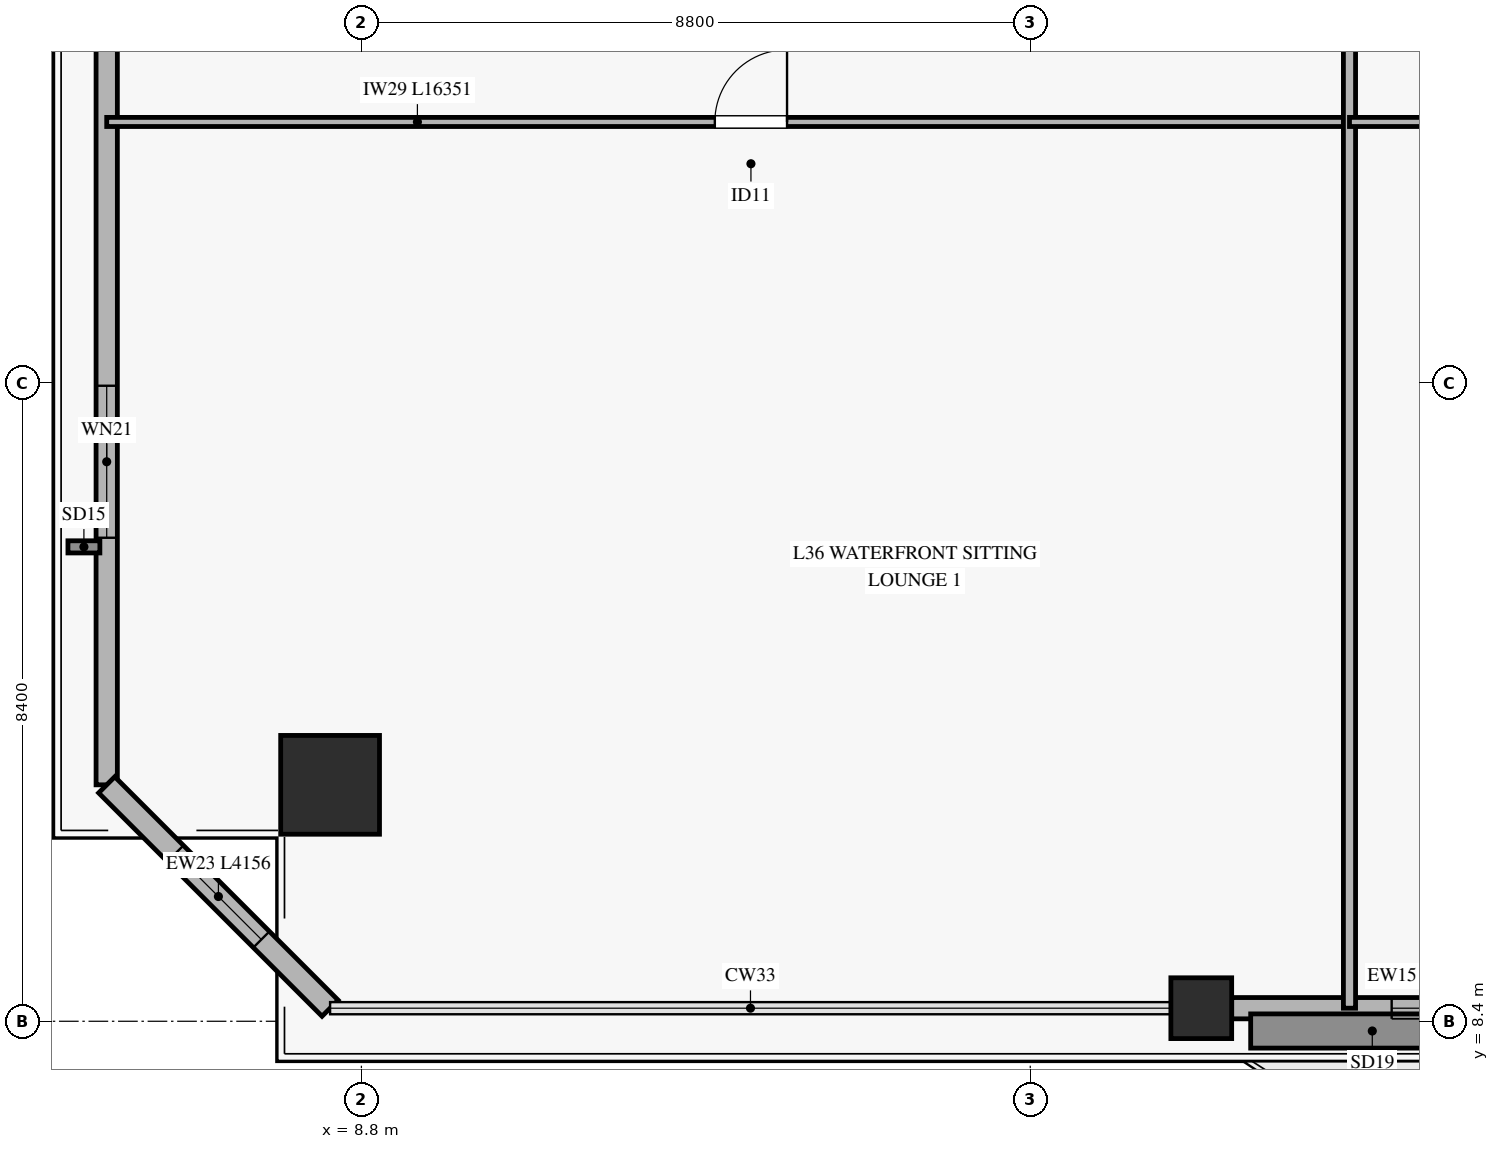
"""IFC4 building model, lengths in metres.
Left out: names, types, materials, properties, quantities, classifications, styles, units other than length and angle.
Written with IfcOpenShell. Run it as: python <this file> out.ifc"""

import sys

from ifc_helpers import new_model, si_unit, direction, frame, frame_2d, origin, origin_2d, place, context, subcontext, project, spatial, rectangle, hollow_rectangle, extrude, source, transform, mapped, element, fill, save


model = new_model("IFC4")
c1 = context("Model", 3, precision=1e-05, world=origin(), true_north=direction((0.0, 1.0)))
c2 = subcontext(c1, "Body", "Model", "MODEL_VIEW")
j1 = project(units=[si_unit("LENGTHUNIT", "METRE"), si_unit("PLANEANGLEUNIT", "RADIAN")], contexts=[c1])
p1 = place(None, origin())
s1 = spatial("IfcSite", under=j1, at=p1, CompositionType="ELEMENT")
p2 = place(p1, origin())
s2 = spatial("IfcBuilding", under=s1, at=p2, CompositionType="ELEMENT")
p3 = place(p2, frame((0.0, 0.0, 149.2)))
s3 = spatial("IfcBuildingStorey", under=s2, at=p3, CompositionType="ELEMENT", Elevation=149.2)
m1 = source(origin(), c2, "Body", "SweptSolid", [
    extrude(hollow_rectangle(XDim=1.3, YDim=1.3, WallThickness=0.06, at=origin_2d()), origin(), (0.0, 0.0, 1.0), 3.27),
])
p4 = place(p3, frame((8.388, 11.511, 0.0), z_axis=(0.0, 0.0, 1.0), x_axis=(1.0, 0.0, 0.0)))
e1 = element("IfcColumn", 1, at=p4, inside=s3, PredefinedType="COLUMN", context=c2, shape_type="MappedRepresentation", body=[
    mapped(m1, transform((0.0, 0.0, 0.0), x_axis=(1.0, 0.0, 0.0), y_axis=(0.0, 1.0, 0.0), z_axis=(0.0, 0.0, 1.0), scale=1.0)),
])
m2 = source(origin(), c2, "Body", "SweptSolid", [
    extrude(hollow_rectangle(XDim=0.8, YDim=0.8, WallThickness=0.036, at=origin_2d()), origin(), (0.0, 0.0, 1.0), 3.27),
])
p5 = place(p3, frame((19.85, 8.572, 0.0), z_axis=(0.0, 0.0, 1.0), x_axis=(1.0, 0.0, 0.0)))
e2 = element("IfcColumn", 2, at=p5, inside=s3, PredefinedType="COLUMN", context=c2, shape_type="MappedRepresentation", body=[
    mapped(m2, transform((0.0, 0.0, 0.0), x_axis=(1.0, 0.0, 0.0), y_axis=(0.0, 1.0, 0.0), z_axis=(0.0, 0.0, 1.0), scale=1.0)),
])
p6 = place(p3, frame((20.25, 8.572, 0.0), z_axis=(0.0, 0.0, 1.0), x_axis=(1.0, 0.0, 0.0)))
e3 = element("IfcWall", 3, at=p6, inside=s3, PredefinedType="SOLIDWALL", context=c2, shape_type="SweptSolid", body=[
    extrude(rectangle(XDim=10.15, YDim=0.28, at=frame_2d((5.075, 0.0))), origin(), (0.0, 0.0, 1.0), 2.75),
])
p7 = place(p6, frame((4.15, 0.0, 0.0)))
e4 = element("IfcOpeningElement", 4, at=p7, cuts=e3, PredefinedType="OPENING", context=c2, shape_type="SweptSolid", body=[
    extrude(rectangle(XDim=1.8, YDim=2.25, at=frame_2d((0.9, 1.125))), frame((0.0, 0.15, 0.0), z_axis=(0.0, -1.0, 0.0), x_axis=(1.0, 0.0, 0.0)), (0.0, 0.0, 1.0), 0.3),
])
p8 = place(p6, frame((2.105, 0.0, 0.45)))
e5 = element("IfcOpeningElement", 5, at=p8, cuts=e3, PredefinedType="OPENING", context=c2, shape_type="SweptSolid", body=[
    extrude(rectangle(XDim=1.6, YDim=2.0, at=frame_2d((0.8, 1.0))), frame((0.0, 0.15, 0.0), z_axis=(0.0, -1.0, 0.0), x_axis=(1.0, 0.0, 0.0)), (0.0, 0.0, 1.0), 0.3),
])
p9 = place(p6, frame((7.77, 0.0, 0.45)))
e6 = element("IfcOpeningElement", 6, at=p9, cuts=e3, PredefinedType="OPENING", context=c2, shape_type="SweptSolid", body=[
    extrude(rectangle(XDim=1.6, YDim=2.0, at=frame_2d((0.8, 1.0))), frame((0.0, 0.15, 0.0), z_axis=(0.0, -1.0, 0.0), x_axis=(1.0, 0.0, 0.0)), (0.0, 0.0, 1.0), 0.3),
])
p10 = place(p3, frame((5.449, 11.511, 0.0), z_axis=(0.0, 0.0, 1.0), x_axis=(0.0, 1.0, 0.0)))
e7 = element("IfcWall", 7, at=p10, inside=s3, PredefinedType="SOLIDWALL", context=c2, shape_type="SweptSolid", body=[
    extrude(rectangle(XDim=15.425, YDim=0.28, at=frame_2d((7.712, 0.0))), origin(), (0.0, 0.0, 1.0), 2.75),
])
p11 = place(p10, frame((3.251, 0.0, 0.45)))
e8 = element("IfcOpeningElement", 8, at=p11, cuts=e7, PredefinedType="OPENING", context=c2, shape_type="SweptSolid", body=[
    extrude(rectangle(XDim=2.0, YDim=2.0, at=frame_2d((1.0, 1.0))), frame((0.0, 0.15, 0.0), z_axis=(0.0, -1.0, 0.0), x_axis=(1.0, 0.0, 0.0)), (0.0, 0.0, 1.0), 0.3),
])
p12 = place(p10, frame((10.463, 0.0, 0.45)))
e9 = element("IfcOpeningElement", 9, at=p12, cuts=e7, PredefinedType="OPENING", context=c2, shape_type="SweptSolid", body=[
    extrude(rectangle(XDim=2.0, YDim=2.0, at=frame_2d((1.0, 1.0))), frame((0.0, 0.15, 0.0), z_axis=(0.0, -1.0, 0.0), x_axis=(1.0, 0.0, 0.0)), (0.0, 0.0, 1.0), 0.3),
])
p13 = place(p3, frame((5.449, 11.511, 0.0), z_axis=(0.0, 0.0, 1.0), x_axis=(0.707106781187, -0.707106781187, 0.0)))
e10 = element("IfcWall", 10, at=p13, inside=s3, PredefinedType="SOLIDWALL", context=c2, shape_type="SweptSolid", body=[
    extrude(rectangle(XDim=4.156, YDim=0.3, at=frame_2d((2.078, 0.0))), origin(), (0.0, 0.0, 1.0), 2.75),
])
p14 = place(p13, frame((1.278, 0.0, 0.45)))
e11 = element("IfcOpeningElement", 11, at=p14, cuts=e10, PredefinedType="OPENING", context=c2, shape_type="SweptSolid", body=[
    extrude(rectangle(XDim=1.6, YDim=2.0, at=frame_2d((0.8, 1.0))), frame((0.0, 0.16, 0.0), z_axis=(0.0, -1.0, 0.0), x_axis=(1.0, 0.0, 0.0)), (0.0, 0.0, 1.0), 0.32),
])
p15 = place(p3, frame((5.449, 20.233, 0.0), z_axis=(0.0, 0.0, 1.0), x_axis=(1.0, 0.0, 0.0)))
e12 = element("IfcWall", 12, at=p15, inside=s3, PredefinedType="PARTITIONING", context=c2, shape_type="SweptSolid", body=[
    extrude(rectangle(XDim=16.351, YDim=0.12, at=frame_2d((8.176, 0.0))), origin(), (0.0, 0.0, 1.0), 2.455),
])
p16 = place(p15, frame((8.001, 0.0, 0.0)))
e13 = element("IfcOpeningElement", 13, at=p16, cuts=e12, PredefinedType="OPENING", context=c2, shape_type="SweptSolid", body=[
    extrude(rectangle(XDim=0.95, YDim=2.1, at=frame_2d((0.475, 1.05))), frame((0.0, 0.07, 0.0), z_axis=(0.0, -1.0, 0.0), x_axis=(1.0, 0.0, 0.0)), (0.0, 0.0, 1.0), 0.14),
])
p17 = place(p3, frame((21.8, 8.572, 0.0), z_axis=(0.0, 0.0, 1.0), x_axis=(0.0, 1.0, 0.0)))
e14 = element("IfcWall", 14, at=p17, inside=s3, PredefinedType="PARTITIONING", context=c2, shape_type="SweptSolid", body=[
    extrude(rectangle(XDim=26.628, YDim=0.16, at=frame_2d((13.314, 0.0))), origin(), (0.0, 0.0, 1.0), 2.755),
])
p18 = place(p3, frame((21.8, 20.233, 0.0), z_axis=(0.0, 0.0, 1.0), x_axis=(1.0, 0.0, 0.0)))
e15 = element("IfcWall", 15, at=p18, inside=s3, PredefinedType="PARTITIONING", context=c2, shape_type="SweptSolid", body=[
    extrude(rectangle(XDim=5.8, YDim=0.12, at=frame_2d((2.9, 0.0))), origin(), (0.0, 0.0, 1.0), 3.27),
])
p19 = place(p18, frame((2.625, 0.0, 0.0)))
e16 = element("IfcOpeningElement", 16, at=p19, cuts=e15, PredefinedType="OPENING", context=c2, shape_type="SweptSolid", body=[
    extrude(rectangle(XDim=0.95, YDim=2.1, at=frame_2d((0.475, 1.05))), frame((0.0, 0.07, 0.0), z_axis=(0.0, -1.0, 0.0), x_axis=(1.0, 0.0, 0.0)), (0.0, 0.0, 1.0), 0.14),
])
m3 = source(origin(), c2, "Body", "SweptSolid", [
    extrude(rectangle(XDim=1.6, YDim=2.0, at=frame_2d((0.8, 1.0))), frame((0.0, 0.03, 0.0), z_axis=(0.0, -1.0, 0.0), x_axis=(1.0, 0.0, 0.0)), (0.0, 0.0, 1.0), 0.06),
])
p20 = place(p8, origin())
e17 = element("IfcWindow", 17, at=p20, inside=s3, PartitioningType="SINGLE_PANEL", PredefinedType="WINDOW", context=c2, shape_type="MappedRepresentation", body=[
    mapped(m3, transform((0.0, 0.0, 0.0), x_axis=(1.0, 0.0, 0.0), y_axis=(0.0, 1.0, 0.0), z_axis=(0.0, 0.0, 1.0), scale=1.0)),
])
fill(e5, e17)
m4 = source(origin(), c2, "Body", "SweptSolid", [
    extrude(rectangle(XDim=2.0, YDim=2.0, at=frame_2d((1.0, 1.0))), frame((0.0, 0.03, 0.0), z_axis=(0.0, -1.0, 0.0), x_axis=(1.0, 0.0, 0.0)), (0.0, 0.0, 1.0), 0.06),
])
p21 = place(p11, origin())
e18 = element("IfcWindow", 18, at=p21, inside=s3, PartitioningType="SINGLE_PANEL", PredefinedType="WINDOW", context=c2, shape_type="MappedRepresentation", body=[
    mapped(m4, transform((0.0, 0.0, 0.0), x_axis=(1.0, 0.0, 0.0), y_axis=(0.0, 1.0, 0.0), z_axis=(0.0, 0.0, 1.0), scale=1.0)),
])
fill(e8, e18)
p22 = place(p14, origin())
e19 = element("IfcWindow", 19, at=p22, inside=s3, PartitioningType="SINGLE_PANEL", PredefinedType="WINDOW", context=c2, shape_type="MappedRepresentation", body=[
    mapped(m3, transform((0.0, 0.0, 0.0), x_axis=(1.0, 0.0, 0.0), y_axis=(0.0, 1.0, 0.0), z_axis=(0.0, 0.0, 1.0), scale=1.0)),
])
fill(e11, e19)
m5 = source(origin(), c2, "Body", "SweptSolid", [
    extrude(rectangle(XDim=0.95, YDim=2.1, at=frame_2d((0.475, 1.05))), frame((0.0, 0.025, 0.0), z_axis=(0.0, -1.0, 0.0), x_axis=(1.0, 0.0, 0.0)), (0.0, 0.0, 1.0), 0.05),
])
p23 = place(p16, origin())
e20 = element("IfcDoor", 20, at=p23, inside=s3, OperationType="SINGLE_SWING_RIGHT", PredefinedType="DOOR", context=c2, shape_type="MappedRepresentation", body=[
    mapped(m5, transform((0.0, 0.0, 0.0), x_axis=(1.0, 0.0, 0.0), y_axis=(0.0, 1.0, 0.0), z_axis=(0.0, 0.0, 1.0), scale=1.0)),
])
fill(e13, e20)
save(model, sys.argv[1])
